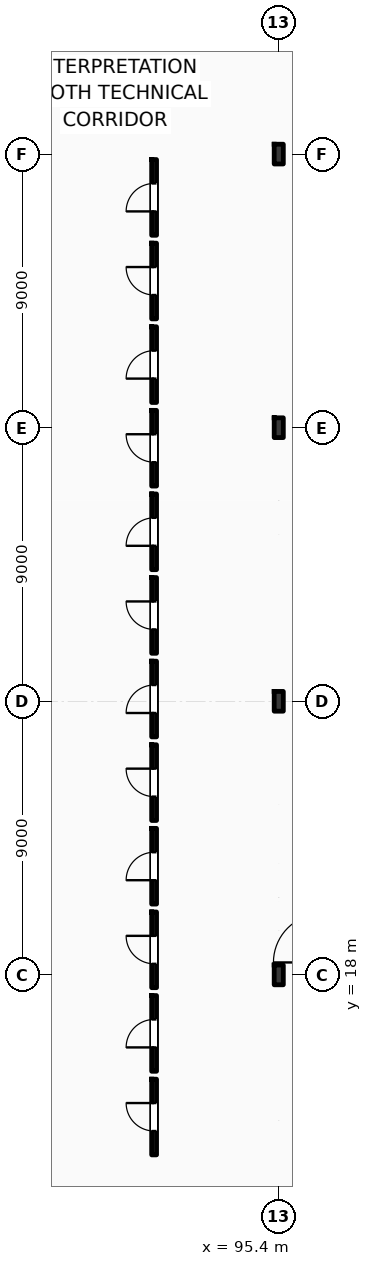
"""IFC4 building model, lengths in metres.
Left out: names, types, materials, properties, quantities, classifications, styles, units other than length and angle.
Written with IfcOpenShell. Run it as: python <this file> out.ifc"""

import sys

from ifc_helpers import new_model, si_unit, direction, frame, frame_2d, origin, origin_2d, place, context, subcontext, project, spatial, rectangle, i_section, extrude, element, fill, save


model = new_model("IFC4")
c1 = context("Model", 3, precision=1e-05, world=origin(), true_north=direction((0.0, 1.0)))
c2 = subcontext(c1, "Body", "Model", "MODEL_VIEW")
j1 = project(units=[si_unit("LENGTHUNIT", "METRE"), si_unit("PLANEANGLEUNIT", "RADIAN")], contexts=[c1])
p1 = place(None, origin())
s1 = spatial("IfcSite", under=j1, at=p1, CompositionType="ELEMENT")
p2 = place(p1, origin())
s2 = spatial("IfcBuilding", under=s1, at=p2, CompositionType="ELEMENT")
p3 = place(p2, frame((0.0, 0.0, 6.0)))
s3 = spatial("IfcBuildingStorey", under=s2, at=p3, CompositionType="ELEMENT", Elevation=6.0)
for number, where, z_axis, x_axis in (
    (1, (95.4, 18.0, 0.0), (0.0, 0.0, 1.0), (1.0, 0.0, 0.0)),
    (2, (95.4, 27.0, 0.0), (0.0, 0.0, 1.0), (1.0, 0.0, 0.0)),
    (3, (95.4, 36.0, 0.0), (0.0, 0.0, 1.0), (1.0, 0.0, 0.0)),
    (4, (95.4, 45.0, 0.0), (0.0, 0.0, 1.0), (1.0, 0.0, 0.0)),
):
    element("IfcColumn", number, at=place(p3, frame(where, z_axis=z_axis, x_axis=x_axis)), inside=s3, PredefinedType="COLUMN", context=c2, shape_type="SweptSolid", body=[
        extrude(i_section(OverallWidth=0.3, OverallDepth=0.65, WebThickness=0.016, FlangeThickness=0.031, FilletRadius=0.027, at=origin_2d()), origin(), (0.0, 0.0, 1.0), 5.4),
    ])
p4 = place(p3, frame((91.3, 12.08, 0.0), z_axis=(0.0, 0.0, 1.0), x_axis=(0.0, 1.0, 0.0)))
e5 = element("IfcWall", 5, at=p4, inside=s3, PredefinedType="PARTITIONING", context=c2, shape_type="SweptSolid", body=[
    extrude(rectangle(XDim=2.49, YDim=0.16, at=frame_2d((1.245, 0.0))), origin(), (0.0, 0.0, 1.0), 5.05),
])
p5 = place(p4, frame((0.785, 0.0, 0.0)))
e6 = element("IfcOpeningElement", 6, at=p5, cuts=e5, PredefinedType="OPENING", context=c2, shape_type="SweptSolid", body=[
    extrude(rectangle(XDim=0.92, YDim=2.12, at=frame_2d((0.46, 1.06))), frame((0.0, 0.09, 0.0), z_axis=(0.0, -1.0, 0.0), x_axis=(1.0, 0.0, 0.0)), (0.0, 0.0, 1.0), 0.18),
])
p6 = place(p3, frame((91.3, 14.83, 0.0), z_axis=(0.0, 0.0, 1.0), x_axis=(0.0, 1.0, 0.0)))
e7 = element("IfcWall", 7, at=p6, inside=s3, PredefinedType="PARTITIONING", context=c2, shape_type="SweptSolid", body=[
    extrude(rectangle(XDim=2.49, YDim=0.16, at=frame_2d((1.245, 0.0))), origin(), (0.0, 0.0, 1.0), 5.05),
])
p7 = place(p6, frame((0.785, 0.0, 0.0)))
e8 = element("IfcOpeningElement", 8, at=p7, cuts=e7, PredefinedType="OPENING", context=c2, shape_type="SweptSolid", body=[
    extrude(rectangle(XDim=0.92, YDim=2.12, at=frame_2d((0.46, 1.06))), frame((0.0, 0.09, 0.0), z_axis=(0.0, -1.0, 0.0), x_axis=(1.0, 0.0, 0.0)), (0.0, 0.0, 1.0), 0.18),
])
p8 = place(p3, frame((91.3, 17.58, 0.0), z_axis=(0.0, 0.0, 1.0), x_axis=(0.0, 1.0, 0.0)))
e9 = element("IfcWall", 9, at=p8, inside=s3, PredefinedType="PARTITIONING", context=c2, shape_type="SweptSolid", body=[
    extrude(rectangle(XDim=2.49, YDim=0.16, at=frame_2d((1.245, 0.0))), origin(), (0.0, 0.0, 1.0), 5.05),
])
p9 = place(p8, frame((0.785, 0.0, 0.0)))
e10 = element("IfcOpeningElement", 10, at=p9, cuts=e9, PredefinedType="OPENING", context=c2, shape_type="SweptSolid", body=[
    extrude(rectangle(XDim=0.92, YDim=2.12, at=frame_2d((0.46, 1.06))), frame((0.0, 0.09, 0.0), z_axis=(0.0, -1.0, 0.0), x_axis=(1.0, 0.0, 0.0)), (0.0, 0.0, 1.0), 0.18),
])
p10 = place(p3, frame((91.3, 20.33, 0.0), z_axis=(0.0, 0.0, 1.0), x_axis=(0.0, 1.0, 0.0)))
e11 = element("IfcWall", 11, at=p10, inside=s3, PredefinedType="PARTITIONING", context=c2, shape_type="SweptSolid", body=[
    extrude(rectangle(XDim=2.49, YDim=0.16, at=frame_2d((1.245, 0.0))), origin(), (0.0, 0.0, 1.0), 5.05),
])
p11 = place(p10, frame((0.785, 0.0, 0.0)))
e12 = element("IfcOpeningElement", 12, at=p11, cuts=e11, PredefinedType="OPENING", context=c2, shape_type="SweptSolid", body=[
    extrude(rectangle(XDim=0.92, YDim=2.12, at=frame_2d((0.46, 1.06))), frame((0.0, 0.09, 0.0), z_axis=(0.0, -1.0, 0.0), x_axis=(1.0, 0.0, 0.0)), (0.0, 0.0, 1.0), 0.18),
])
p12 = place(p3, frame((91.3, 23.08, 0.0), z_axis=(0.0, 0.0, 1.0), x_axis=(0.0, 1.0, 0.0)))
e13 = element("IfcWall", 13, at=p12, inside=s3, PredefinedType="PARTITIONING", context=c2, shape_type="SweptSolid", body=[
    extrude(rectangle(XDim=2.49, YDim=0.16, at=frame_2d((1.245, 0.0))), origin(), (0.0, 0.0, 1.0), 5.05),
])
p13 = place(p12, frame((0.785, 0.0, 0.0)))
e14 = element("IfcOpeningElement", 14, at=p13, cuts=e13, PredefinedType="OPENING", context=c2, shape_type="SweptSolid", body=[
    extrude(rectangle(XDim=0.92, YDim=2.12, at=frame_2d((0.46, 1.06))), frame((0.0, 0.09, 0.0), z_axis=(0.0, -1.0, 0.0), x_axis=(1.0, 0.0, 0.0)), (0.0, 0.0, 1.0), 0.18),
])
p14 = place(p3, frame((91.3, 25.83, 0.0), z_axis=(0.0, 0.0, 1.0), x_axis=(0.0, 1.0, 0.0)))
e15 = element("IfcWall", 15, at=p14, inside=s3, PredefinedType="PARTITIONING", context=c2, shape_type="SweptSolid", body=[
    extrude(rectangle(XDim=2.49, YDim=0.16, at=frame_2d((1.245, 0.0))), origin(), (0.0, 0.0, 1.0), 5.05),
])
p15 = place(p14, frame((0.785, 0.0, 0.0)))
e16 = element("IfcOpeningElement", 16, at=p15, cuts=e15, PredefinedType="OPENING", context=c2, shape_type="SweptSolid", body=[
    extrude(rectangle(XDim=0.92, YDim=2.12, at=frame_2d((0.46, 1.06))), frame((0.0, 0.09, 0.0), z_axis=(0.0, -1.0, 0.0), x_axis=(1.0, 0.0, 0.0)), (0.0, 0.0, 1.0), 0.18),
])
p16 = place(p3, frame((91.3, 28.58, 0.0), z_axis=(0.0, 0.0, 1.0), x_axis=(0.0, 1.0, 0.0)))
e17 = element("IfcWall", 17, at=p16, inside=s3, PredefinedType="PARTITIONING", context=c2, shape_type="SweptSolid", body=[
    extrude(rectangle(XDim=2.49, YDim=0.16, at=frame_2d((1.245, 0.0))), origin(), (0.0, 0.0, 1.0), 5.05),
])
p17 = place(p16, frame((0.785, 0.0, 0.0)))
e18 = element("IfcOpeningElement", 18, at=p17, cuts=e17, PredefinedType="OPENING", context=c2, shape_type="SweptSolid", body=[
    extrude(rectangle(XDim=0.92, YDim=2.12, at=frame_2d((0.46, 1.06))), frame((0.0, 0.09, 0.0), z_axis=(0.0, -1.0, 0.0), x_axis=(1.0, 0.0, 0.0)), (0.0, 0.0, 1.0), 0.18),
])
p18 = place(p3, frame((91.3, 31.33, 0.0), z_axis=(0.0, 0.0, 1.0), x_axis=(0.0, 1.0, 0.0)))
e19 = element("IfcWall", 19, at=p18, inside=s3, PredefinedType="PARTITIONING", context=c2, shape_type="SweptSolid", body=[
    extrude(rectangle(XDim=2.49, YDim=0.16, at=frame_2d((1.245, 0.0))), origin(), (0.0, 0.0, 1.0), 5.05),
])
p19 = place(p18, frame((0.785, 0.0, 0.0)))
e20 = element("IfcOpeningElement", 20, at=p19, cuts=e19, PredefinedType="OPENING", context=c2, shape_type="SweptSolid", body=[
    extrude(rectangle(XDim=0.92, YDim=2.12, at=frame_2d((0.46, 1.06))), frame((0.0, 0.09, 0.0), z_axis=(0.0, -1.0, 0.0), x_axis=(1.0, 0.0, 0.0)), (0.0, 0.0, 1.0), 0.18),
])
p20 = place(p3, frame((91.3, 34.08, 0.0), z_axis=(0.0, 0.0, 1.0), x_axis=(0.0, 1.0, 0.0)))
e21 = element("IfcWall", 21, at=p20, inside=s3, PredefinedType="PARTITIONING", context=c2, shape_type="SweptSolid", body=[
    extrude(rectangle(XDim=2.49, YDim=0.16, at=frame_2d((1.245, 0.0))), origin(), (0.0, 0.0, 1.0), 5.05),
])
p21 = place(p20, frame((0.785, 0.0, 0.0)))
e22 = element("IfcOpeningElement", 22, at=p21, cuts=e21, PredefinedType="OPENING", context=c2, shape_type="SweptSolid", body=[
    extrude(rectangle(XDim=0.92, YDim=2.12, at=frame_2d((0.46, 1.06))), frame((0.0, 0.09, 0.0), z_axis=(0.0, -1.0, 0.0), x_axis=(1.0, 0.0, 0.0)), (0.0, 0.0, 1.0), 0.18),
])
p22 = place(p3, frame((91.3, 36.83, 0.0), z_axis=(0.0, 0.0, 1.0), x_axis=(0.0, 1.0, 0.0)))
e23 = element("IfcWall", 23, at=p22, inside=s3, PredefinedType="PARTITIONING", context=c2, shape_type="SweptSolid", body=[
    extrude(rectangle(XDim=2.49, YDim=0.16, at=frame_2d((1.245, 0.0))), origin(), (0.0, 0.0, 1.0), 5.05),
])
p23 = place(p22, frame((0.785, 0.0, 0.0)))
e24 = element("IfcOpeningElement", 24, at=p23, cuts=e23, PredefinedType="OPENING", context=c2, shape_type="SweptSolid", body=[
    extrude(rectangle(XDim=0.92, YDim=2.12, at=frame_2d((0.46, 1.06))), frame((0.0, 0.09, 0.0), z_axis=(0.0, -1.0, 0.0), x_axis=(1.0, 0.0, 0.0)), (0.0, 0.0, 1.0), 0.18),
])
p24 = place(p3, frame((91.3, 39.58, 0.0), z_axis=(0.0, 0.0, 1.0), x_axis=(0.0, 1.0, 0.0)))
e25 = element("IfcWall", 25, at=p24, inside=s3, PredefinedType="PARTITIONING", context=c2, shape_type="SweptSolid", body=[
    extrude(rectangle(XDim=2.49, YDim=0.16, at=frame_2d((1.245, 0.0))), origin(), (0.0, 0.0, 1.0), 5.05),
])
p25 = place(p24, frame((0.785, 0.0, 0.0)))
e26 = element("IfcOpeningElement", 26, at=p25, cuts=e25, PredefinedType="OPENING", context=c2, shape_type="SweptSolid", body=[
    extrude(rectangle(XDim=0.92, YDim=2.12, at=frame_2d((0.46, 1.06))), frame((0.0, 0.09, 0.0), z_axis=(0.0, -1.0, 0.0), x_axis=(1.0, 0.0, 0.0)), (0.0, 0.0, 1.0), 0.18),
])
p26 = place(p3, frame((91.3, 42.33, 0.0), z_axis=(0.0, 0.0, 1.0), x_axis=(0.0, 1.0, 0.0)))
e27 = element("IfcWall", 27, at=p26, inside=s3, PredefinedType="PARTITIONING", context=c2, shape_type="SweptSolid", body=[
    extrude(rectangle(XDim=2.49, YDim=0.16, at=frame_2d((1.245, 0.0))), origin(), (0.0, 0.0, 1.0), 5.05),
])
p27 = place(p26, frame((0.785, 0.0, 0.0)))
e28 = element("IfcOpeningElement", 28, at=p27, cuts=e27, PredefinedType="OPENING", context=c2, shape_type="SweptSolid", body=[
    extrude(rectangle(XDim=0.92, YDim=2.12, at=frame_2d((0.46, 1.06))), frame((0.0, 0.09, 0.0), z_axis=(0.0, -1.0, 0.0), x_axis=(1.0, 0.0, 0.0)), (0.0, 0.0, 1.0), 0.18),
])
p28 = place(p5, origin())
e29 = element("IfcDoor", 29, at=p28, inside=s3, OperationType="SINGLE_SWING_RIGHT", PredefinedType="DOOR", context=c2, shape_type="SweptSolid", body=[
    extrude(rectangle(XDim=0.92, YDim=2.12, at=frame_2d((0.46, 1.06))), frame((0.0, 0.025, 0.0), z_axis=(0.0, -1.0, 0.0), x_axis=(1.0, 0.0, 0.0)), (0.0, 0.0, 1.0), 0.05),
])
fill(e6, e29)
p29 = place(p7, origin())
e30 = element("IfcDoor", 30, at=p29, inside=s3, OperationType="SINGLE_SWING_LEFT", PredefinedType="DOOR", context=c2, shape_type="SweptSolid", body=[
    extrude(rectangle(XDim=0.92, YDim=2.12, at=frame_2d((0.46, 1.06))), frame((0.0, 0.025, 0.0), z_axis=(0.0, -1.0, 0.0), x_axis=(1.0, 0.0, 0.0)), (0.0, 0.0, 1.0), 0.05),
])
fill(e8, e30)
p30 = place(p9, origin())
e31 = element("IfcDoor", 31, at=p30, inside=s3, OperationType="SINGLE_SWING_RIGHT", PredefinedType="DOOR", context=c2, shape_type="SweptSolid", body=[
    extrude(rectangle(XDim=0.92, YDim=2.12, at=frame_2d((0.46, 1.06))), frame((0.0, 0.025, 0.0), z_axis=(0.0, -1.0, 0.0), x_axis=(1.0, 0.0, 0.0)), (0.0, 0.0, 1.0), 0.05),
])
fill(e10, e31)
p31 = place(p11, origin())
e32 = element("IfcDoor", 32, at=p31, inside=s3, OperationType="SINGLE_SWING_LEFT", PredefinedType="DOOR", context=c2, shape_type="SweptSolid", body=[
    extrude(rectangle(XDim=0.92, YDim=2.12, at=frame_2d((0.46, 1.06))), frame((0.0, 0.025, 0.0), z_axis=(0.0, -1.0, 0.0), x_axis=(1.0, 0.0, 0.0)), (0.0, 0.0, 1.0), 0.05),
])
fill(e12, e32)
p32 = place(p13, origin())
e33 = element("IfcDoor", 33, at=p32, inside=s3, OperationType="SINGLE_SWING_RIGHT", PredefinedType="DOOR", context=c2, shape_type="SweptSolid", body=[
    extrude(rectangle(XDim=0.92, YDim=2.12, at=frame_2d((0.46, 1.06))), frame((0.0, 0.025, 0.0), z_axis=(0.0, -1.0, 0.0), x_axis=(1.0, 0.0, 0.0)), (0.0, 0.0, 1.0), 0.05),
])
fill(e14, e33)
p33 = place(p15, origin())
e34 = element("IfcDoor", 34, at=p33, inside=s3, OperationType="SINGLE_SWING_LEFT", PredefinedType="DOOR", context=c2, shape_type="SweptSolid", body=[
    extrude(rectangle(XDim=0.92, YDim=2.12, at=frame_2d((0.46, 1.06))), frame((0.0, 0.025, 0.0), z_axis=(0.0, -1.0, 0.0), x_axis=(1.0, 0.0, 0.0)), (0.0, 0.0, 1.0), 0.05),
])
fill(e16, e34)
p34 = place(p17, origin())
e35 = element("IfcDoor", 35, at=p34, inside=s3, OperationType="SINGLE_SWING_RIGHT", PredefinedType="DOOR", context=c2, shape_type="SweptSolid", body=[
    extrude(rectangle(XDim=0.92, YDim=2.12, at=frame_2d((0.46, 1.06))), frame((0.0, 0.025, 0.0), z_axis=(0.0, -1.0, 0.0), x_axis=(1.0, 0.0, 0.0)), (0.0, 0.0, 1.0), 0.05),
])
fill(e18, e35)
p35 = place(p19, origin())
e36 = element("IfcDoor", 36, at=p35, inside=s3, OperationType="SINGLE_SWING_LEFT", PredefinedType="DOOR", context=c2, shape_type="SweptSolid", body=[
    extrude(rectangle(XDim=0.92, YDim=2.12, at=frame_2d((0.46, 1.06))), frame((0.0, 0.025, 0.0), z_axis=(0.0, -1.0, 0.0), x_axis=(1.0, 0.0, 0.0)), (0.0, 0.0, 1.0), 0.05),
])
fill(e20, e36)
p36 = place(p21, origin())
e37 = element("IfcDoor", 37, at=p36, inside=s3, OperationType="SINGLE_SWING_RIGHT", PredefinedType="DOOR", context=c2, shape_type="SweptSolid", body=[
    extrude(rectangle(XDim=0.92, YDim=2.12, at=frame_2d((0.46, 1.06))), frame((0.0, 0.025, 0.0), z_axis=(0.0, -1.0, 0.0), x_axis=(1.0, 0.0, 0.0)), (0.0, 0.0, 1.0), 0.05),
])
fill(e22, e37)
p37 = place(p23, origin())
e38 = element("IfcDoor", 38, at=p37, inside=s3, OperationType="SINGLE_SWING_LEFT", PredefinedType="DOOR", context=c2, shape_type="SweptSolid", body=[
    extrude(rectangle(XDim=0.92, YDim=2.12, at=frame_2d((0.46, 1.06))), frame((0.0, 0.025, 0.0), z_axis=(0.0, -1.0, 0.0), x_axis=(1.0, 0.0, 0.0)), (0.0, 0.0, 1.0), 0.05),
])
fill(e24, e38)
p38 = place(p25, origin())
e39 = element("IfcDoor", 39, at=p38, inside=s3, OperationType="SINGLE_SWING_RIGHT", PredefinedType="DOOR", context=c2, shape_type="SweptSolid", body=[
    extrude(rectangle(XDim=0.92, YDim=2.12, at=frame_2d((0.46, 1.06))), frame((0.0, 0.025, 0.0), z_axis=(0.0, -1.0, 0.0), x_axis=(1.0, 0.0, 0.0)), (0.0, 0.0, 1.0), 0.05),
])
fill(e26, e39)
p39 = place(p27, origin())
e40 = element("IfcDoor", 40, at=p39, inside=s3, OperationType="SINGLE_SWING_LEFT", PredefinedType="DOOR", context=c2, shape_type="SweptSolid", body=[
    extrude(rectangle(XDim=0.92, YDim=2.12, at=frame_2d((0.46, 1.06))), frame((0.0, 0.025, 0.0), z_axis=(0.0, -1.0, 0.0), x_axis=(1.0, 0.0, 0.0)), (0.0, 0.0, 1.0), 0.05),
])
fill(e28, e40)
save(model, sys.argv[1])
